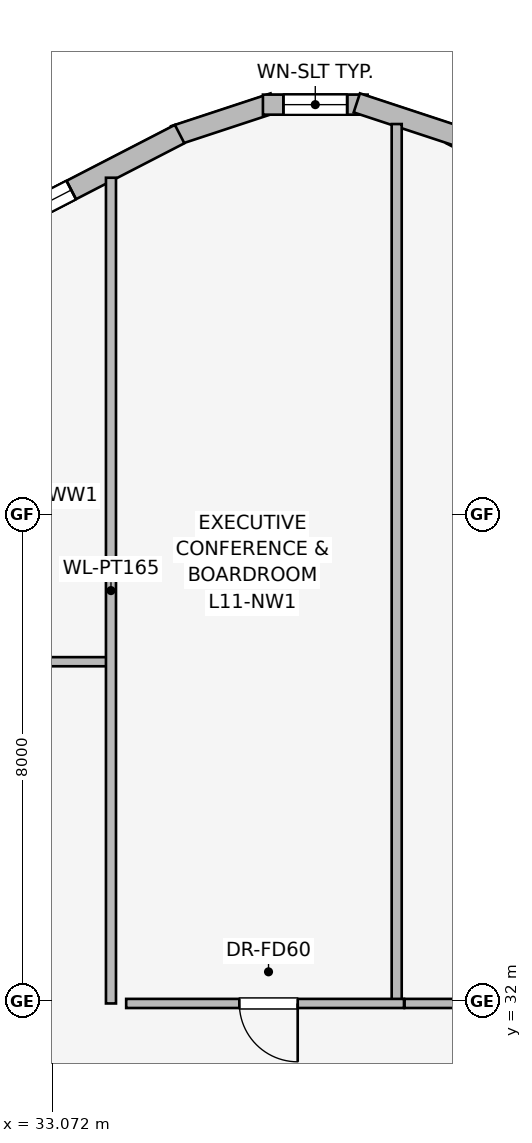
"""IFC4 building model, lengths in metres.
Left out: names, types, materials, properties, quantities, classifications, styles, units other than length and angle.
Written with IfcOpenShell. Run it as: python <this file> out.ifc"""

import sys

from ifc_helpers import new_model, si_unit, direction, frame, frame_2d, origin, place, context, subcontext, project, spatial, rectangle, extrude, element, fill, save


model = new_model("IFC4")
c1 = context("Model", 3, precision=1e-05, world=origin(), true_north=direction((0.0, 1.0)))
c2 = subcontext(c1, "Body", "Model", "MODEL_VIEW")
j1 = project(units=[si_unit("LENGTHUNIT", "METRE"), si_unit("PLANEANGLEUNIT", "RADIAN")], contexts=[c1])
p1 = place(None, origin())
s1 = spatial("IfcSite", under=j1, at=p1, CompositionType="ELEMENT")
p2 = place(p1, origin())
s2 = spatial("IfcBuilding", under=s1, at=p2, CompositionType="ELEMENT")
p3 = place(p2, frame((0.0, 0.0, 45.25)))
s3 = spatial("IfcBuildingStorey", under=s2, at=p3, CompositionType="ELEMENT", Elevation=45.25)
p4 = place(p3, frame((39.631, 46.257, 0.0), z_axis=(0.0, 0.0, 1.0), x_axis=(0.888634413993, -0.458616264721, 0.0)))
e1 = element("IfcWall", 1, at=p4, inside=s3, PredefinedType="STANDARD", context=c2, shape_type="SweptSolid", body=[
    extrude(rectangle(XDim=20.531, YDim=0.34, at=frame_2d((10.266, 0.0))), origin(), (0.0, 0.0, 1.0), 2.684),
])
p5 = place(p4, frame((1.058, 0.0, 0.75)))
e2 = element("IfcOpeningElement", 2, at=p5, cuts=e1, PredefinedType="OPENING", context=c2, shape_type="SweptSolid", body=[
    extrude(rectangle(XDim=1.8, YDim=1.5, at=frame_2d((0.9, 0.75))), frame((0.0, 0.18, 0.0), z_axis=(0.0, -1.0, 0.0), x_axis=(1.0, 0.0, 0.0)), (0.0, 0.0, 1.0), 0.36),
])
p6 = place(p4, frame((5.11, 0.0, 0.75)))
e3 = element("IfcOpeningElement", 3, at=p6, cuts=e1, PredefinedType="OPENING", context=c2, shape_type="SweptSolid", body=[
    extrude(rectangle(XDim=1.5, YDim=1.5, at=frame_2d((0.75, 0.75))), frame((0.0, 0.18, 0.0), z_axis=(0.0, -1.0, 0.0), x_axis=(1.0, 0.0, 0.0)), (0.0, 0.0, 1.0), 0.36),
])
p7 = place(p4, frame((7.138, 0.0, 0.75)))
e4 = element("IfcOpeningElement", 4, at=p7, cuts=e1, PredefinedType="OPENING", context=c2, shape_type="SweptSolid", body=[
    extrude(rectangle(XDim=1.5, YDim=1.5, at=frame_2d((0.75, 0.75))), frame((0.0, 0.18, 0.0), z_axis=(0.0, -1.0, 0.0), x_axis=(1.0, 0.0, 0.0)), (0.0, 0.0, 1.0), 0.36),
])
p8 = place(p4, frame((9.165, 0.0, 0.75)))
e5 = element("IfcOpeningElement", 5, at=p8, cuts=e1, PredefinedType="OPENING", context=c2, shape_type="SweptSolid", body=[
    extrude(rectangle(XDim=1.5, YDim=1.5, at=frame_2d((0.75, 0.75))), frame((0.0, 0.18, 0.0), z_axis=(0.0, -1.0, 0.0), x_axis=(1.0, 0.0, 0.0)), (0.0, 0.0, 1.0), 0.36),
])
p9 = place(p4, frame((12.77, 0.0, 0.75)))
e6 = element("IfcOpeningElement", 6, at=p9, cuts=e1, PredefinedType="OPENING", context=c2, shape_type="SweptSolid", body=[
    extrude(rectangle(XDim=1.8, YDim=1.5, at=frame_2d((0.9, 0.75))), frame((0.0, 0.18, 0.0), z_axis=(0.0, -1.0, 0.0), x_axis=(1.0, 0.0, 0.0)), (0.0, 0.0, 1.0), 0.36),
])
p10 = place(p4, frame((17.98, 0.0, 0.75)))
e7 = element("IfcOpeningElement", 7, at=p10, cuts=e1, PredefinedType="OPENING", context=c2, shape_type="SweptSolid", body=[
    extrude(rectangle(XDim=1.5, YDim=1.5, at=frame_2d((0.75, 0.75))), frame((0.0, 0.18, 0.0), z_axis=(0.0, -1.0, 0.0), x_axis=(1.0, 0.0, 0.0)), (0.0, 0.0, 1.0), 0.36),
])
p11 = place(p3, frame((35.081, 46.231, 0.0), z_axis=(0.0, 0.0, 1.0), x_axis=(0.94976901097, 0.312951794691, 0.0)))
e8 = element("IfcWall", 8, at=p11, inside=s3, PredefinedType="STANDARD", context=c2, shape_type="SweptSolid", body=[
    extrude(rectangle(XDim=1.722, YDim=0.33, at=frame_2d((0.861, 0.0))), origin(), (0.0, 0.0, 1.0), 3.39),
])
p12 = place(p3, frame((36.539, 46.741, 0.0), z_axis=(0.0, 0.0, 1.0), x_axis=(1.0, 0.0, 0.0)))
e9 = element("IfcWall", 9, at=p12, inside=s3, PredefinedType="STANDARD", context=c2, shape_type="SweptSolid", body=[
    extrude(rectangle(XDim=1.722, YDim=0.33, at=frame_2d((0.861, 0.0))), origin(), (0.0, 0.0, 1.0), 3.39),
])
p13 = place(p12, frame((0.336, 0.0, 0.75)))
e10 = element("IfcOpeningElement", 10, at=p13, cuts=e9, PredefinedType="OPENING", context=c2, shape_type="SweptSolid", body=[
    extrude(rectangle(XDim=1.05, YDim=1.4, at=frame_2d((0.525, 0.7))), frame((0.0, 0.175, 0.0), z_axis=(0.0, -1.0, 0.0), x_axis=(1.0, 0.0, 0.0)), (0.0, 0.0, 1.0), 0.35),
])
p14 = place(p3, frame((38.083, 46.77, 0.0), z_axis=(0.0, 0.0, 1.0), x_axis=(0.94976901097, -0.312951794691, 0.0)))
e11 = element("IfcWall", 11, at=p14, inside=s3, PredefinedType="STANDARD", context=c2, shape_type="SweptSolid", body=[
    extrude(rectangle(XDim=1.722, YDim=0.33, at=frame_2d((0.861, 0.0))), origin(), (0.0, 0.0, 1.0), 3.39),
])
p15 = place(p3, frame((16.924, 36.841, 0.0), z_axis=(0.0, 0.0, 1.0), x_axis=(0.888634413993, 0.458616264721, 0.0)))
e12 = element("IfcWall", 12, at=p15, inside=s3, PredefinedType="STANDARD", context=c2, shape_type="SweptSolid", body=[
    extrude(rectangle(XDim=20.531, YDim=0.34, at=frame_2d((10.266, 0.0))), origin(), (0.0, 0.0, 1.0), 2.684),
])
p16 = place(p15, frame((9.716, 0.0, 0.0)))
e13 = element("IfcOpeningElement", 13, at=p16, cuts=e12, PredefinedType="OPENING", context=c2, shape_type="SweptSolid", body=[
    extrude(rectangle(XDim=1.1, YDim=2.04, at=frame_2d((0.55, 1.02))), frame((0.0, 0.18, 0.0), z_axis=(0.0, -1.0, 0.0), x_axis=(1.0, 0.0, 0.0)), (0.0, 0.0, 1.0), 0.36),
])
p17 = place(p15, frame((2.161, 0.0, 0.75)))
e14 = element("IfcOpeningElement", 14, at=p17, cuts=e12, PredefinedType="OPENING", context=c2, shape_type="SweptSolid", body=[
    extrude(rectangle(XDim=1.05, YDim=1.4, at=frame_2d((0.525, 0.7))), frame((0.0, 0.18, 0.0), z_axis=(0.0, -1.0, 0.0), x_axis=(1.0, 0.0, 0.0)), (0.0, 0.0, 1.0), 0.36),
])
p18 = place(p15, frame((5.234, 0.0, 0.75)))
e15 = element("IfcOpeningElement", 15, at=p18, cuts=e12, PredefinedType="OPENING", context=c2, shape_type="SweptSolid", body=[
    extrude(rectangle(XDim=1.5, YDim=1.5, at=frame_2d((0.75, 0.75))), frame((0.0, 0.18, 0.0), z_axis=(0.0, -1.0, 0.0), x_axis=(1.0, 0.0, 0.0)), (0.0, 0.0, 1.0), 0.36),
])
p19 = place(p15, frame((7.509, 0.0, 0.75)))
e16 = element("IfcOpeningElement", 16, at=p19, cuts=e12, PredefinedType="OPENING", context=c2, shape_type="SweptSolid", body=[
    extrude(rectangle(XDim=1.5, YDim=1.5, at=frame_2d((0.75, 0.75))), frame((0.0, 0.18, 0.0), z_axis=(0.0, -1.0, 0.0), x_axis=(1.0, 0.0, 0.0)), (0.0, 0.0, 1.0), 0.36),
])
p20 = place(p15, frame((11.373, 0.0, 0.75)))
e17 = element("IfcOpeningElement", 17, at=p20, cuts=e12, PredefinedType="OPENING", context=c2, shape_type="SweptSolid", body=[
    extrude(rectangle(XDim=1.8, YDim=1.5, at=frame_2d((0.9, 0.75))), frame((0.0, 0.18, 0.0), z_axis=(0.0, -1.0, 0.0), x_axis=(1.0, 0.0, 0.0)), (0.0, 0.0, 1.0), 0.36),
])
p21 = place(p15, frame((13.648, 0.0, 0.75)))
e18 = element("IfcOpeningElement", 18, at=p21, cuts=e12, PredefinedType="OPENING", context=c2, shape_type="SweptSolid", body=[
    extrude(rectangle(XDim=1.8, YDim=1.5, at=frame_2d((0.9, 0.75))), frame((0.0, 0.18, 0.0), z_axis=(0.0, -1.0, 0.0), x_axis=(1.0, 0.0, 0.0)), (0.0, 0.0, 1.0), 0.36),
])
p22 = place(p15, frame((17.476, 0.0, 0.75)))
e19 = element("IfcOpeningElement", 19, at=p22, cuts=e12, PredefinedType="OPENING", context=c2, shape_type="SweptSolid", body=[
    extrude(rectangle(XDim=1.05, YDim=1.4, at=frame_2d((0.525, 0.7))), frame((0.0, 0.18, 0.0), z_axis=(0.0, -1.0, 0.0), x_axis=(1.0, 0.0, 0.0)), (0.0, 0.0, 1.0), 0.36),
])
p23 = place(p3, frame((34.0, 37.58, 0.0), z_axis=(0.0, 0.0, 1.0), x_axis=(-1.0, 0.0, 0.0)))
e20 = element("IfcWall", 20, at=p23, inside=s3, PredefinedType="PARTITIONING", context=c2, shape_type="SweptSolid", body=[
    extrude(rectangle(XDim=15.6, YDim=0.15, at=frame_2d((7.8, 0.0))), origin(), (0.0, 0.0, 1.0), 3.39),
])
p24 = place(p23, frame((5.195, 0.0, 0.0)))
e21 = element("IfcOpeningElement", 21, at=p24, cuts=e20, PredefinedType="OPENING", context=c2, shape_type="SweptSolid", body=[
    extrude(rectangle(XDim=0.96, YDim=2.0, at=frame_2d((0.48, 1.0))), frame((0.0, 0.085, 0.0), z_axis=(0.0, -1.0, 0.0), x_axis=(1.0, 0.0, 0.0)), (0.0, 0.0, 1.0), 0.17),
])
p25 = place(p3, frame((34.04, 31.96, 0.0), z_axis=(0.0, 0.0, 1.0), x_axis=(0.0, 1.0, 0.0)))
e22 = element("IfcWall", 22, at=p25, inside=s3, PredefinedType="PARTITIONING", context=c2, shape_type="SweptSolid", body=[
    extrude(rectangle(XDim=13.579, YDim=0.165, at=frame_2d((6.79, 0.0))), origin(), (0.0, 0.0, 1.0), 3.39),
])
p26 = place(p3, frame((38.739, 31.97, 0.0), z_axis=(0.0, 0.0, 1.0), x_axis=(0.0, 1.0, 0.0)))
e23 = element("IfcWall", 23, at=p26, inside=s3, PredefinedType="PARTITIONING", context=c2, shape_type="SweptSolid", body=[
    extrude(rectangle(XDim=14.452, YDim=0.165, at=frame_2d((7.226, 0.0))), origin(), (0.0, 0.0, 1.0), 3.39),
])
p27 = place(p3, frame((38.859, 31.96, 0.0), z_axis=(0.0, 0.0, 1.0), x_axis=(-1.0, 0.0, 0.0)))
e24 = element("IfcWall", 24, at=p27, inside=s3, PredefinedType="PARTITIONING", context=c2, shape_type="SweptSolid", body=[
    extrude(rectangle(XDim=4.569, YDim=0.15, at=frame_2d((2.284, 0.0))), origin(), (0.0, 0.0, 1.0), 3.39),
])
p28 = place(p27, frame((1.748, 0.0, 0.0)))
e25 = element("IfcOpeningElement", 25, at=p28, cuts=e24, PredefinedType="OPENING", context=c2, shape_type="SweptSolid", body=[
    extrude(rectangle(XDim=0.96, YDim=2.0, at=frame_2d((0.48, 1.0))), frame((0.0, 0.085, 0.0), z_axis=(0.0, -1.0, 0.0), x_axis=(1.0, 0.0, 0.0)), (0.0, 0.0, 1.0), 0.17),
])
p29 = place(p3, frame((43.382, 31.96, 0.0), z_axis=(0.0, 0.0, 1.0), x_axis=(-1.0, 0.0, 0.0)))
e26 = element("IfcWall", 26, at=p29, inside=s3, PredefinedType="PARTITIONING", context=c2, shape_type="SweptSolid", body=[
    extrude(rectangle(XDim=4.513, YDim=0.15, at=frame_2d((2.257, 0.0))), origin(), (0.0, 0.0, 1.0), 3.39),
])
p30 = place(p29, frame((1.834, 0.0, 0.0)))
e27 = element("IfcOpeningElement", 27, at=p30, cuts=e26, PredefinedType="OPENING", context=c2, shape_type="SweptSolid", body=[
    extrude(rectangle(XDim=0.96, YDim=2.0, at=frame_2d((0.48, 1.0))), frame((0.0, 0.085, 0.0), z_axis=(0.0, -1.0, 0.0), x_axis=(1.0, 0.0, 0.0)), (0.0, 0.0, 1.0), 0.17),
])
p31 = place(p13, origin())
e28 = element("IfcWindow", 28, at=p31, inside=s3, PartitioningType="SINGLE_PANEL", PredefinedType="WINDOW", context=c2, shape_type="SweptSolid", body=[
    extrude(rectangle(XDim=1.05, YDim=1.4, at=frame_2d((0.525, 0.7))), frame((0.0, 0.03, 0.0), z_axis=(0.0, -1.0, 0.0), x_axis=(1.0, 0.0, 0.0)), (0.0, 0.0, 1.0), 0.06),
])
fill(e10, e28)
p32 = place(p22, origin())
e29 = element("IfcWindow", 29, at=p32, inside=s3, PartitioningType="SINGLE_PANEL", PredefinedType="WINDOW", context=c2, shape_type="SweptSolid", body=[
    extrude(rectangle(XDim=1.05, YDim=1.4, at=frame_2d((0.525, 0.7))), frame((0.0, 0.03, 0.0), z_axis=(0.0, -1.0, 0.0), x_axis=(1.0, 0.0, 0.0)), (0.0, 0.0, 1.0), 0.06),
])
fill(e19, e29)
p33 = place(p28, origin())
e30 = element("IfcDoor", 30, at=p33, inside=s3, OperationType="SINGLE_SWING_LEFT", PredefinedType="DOOR", context=c2, shape_type="SweptSolid", body=[
    extrude(rectangle(XDim=0.96, YDim=2.0, at=frame_2d((0.48, 1.0))), frame((0.0, 0.025, 0.0), z_axis=(0.0, -1.0, 0.0), x_axis=(1.0, 0.0, 0.0)), (0.0, 0.0, 1.0), 0.05),
])
fill(e25, e30)
save(model, sys.argv[1])
